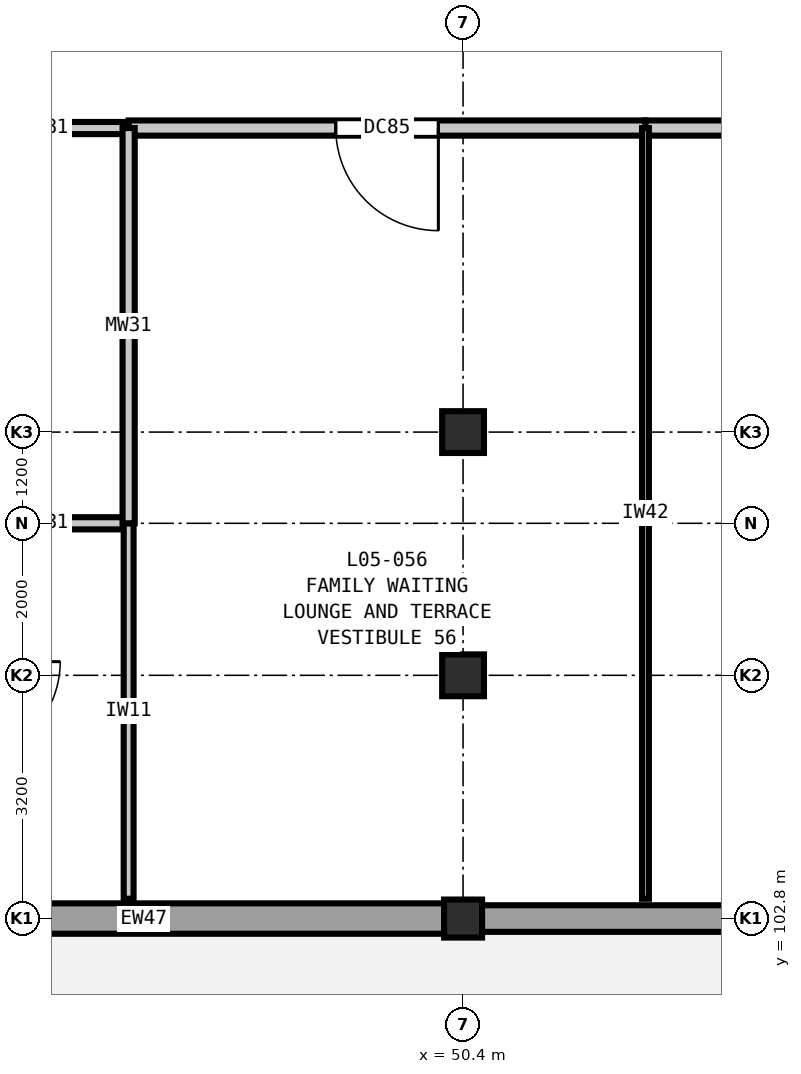
"""IFC4 building model, lengths in metres.
Left out: names, types, materials, properties, quantities, classifications, styles, units other than length and angle.
Written with IfcOpenShell. Run it as: python <this file> out.ifc"""

import sys

from ifc_helpers import new_model, si_unit, direction, frame, frame_2d, origin, origin_2d, place, context, subcontext, project, spatial, rectangle, extrude, element, fill, save


model = new_model("IFC4")
c1 = context("Model", 3, precision=1e-05, world=origin(), true_north=direction((0.0, 1.0)))
c2 = subcontext(c1, "Body", "Model", "MODEL_VIEW")
j1 = project(units=[si_unit("LENGTHUNIT", "METRE"), si_unit("PLANEANGLEUNIT", "RADIAN")], contexts=[c1])
p1 = place(None, origin())
s1 = spatial("IfcSite", under=j1, at=p1, CompositionType="ELEMENT")
p2 = place(p1, origin())
s2 = spatial("IfcBuilding", under=s1, at=p2, CompositionType="ELEMENT")
p3 = place(p2, frame((0.0, 0.0, 24.6)))
s3 = spatial("IfcBuildingStorey", under=s2, at=p3, CompositionType="ELEMENT", Elevation=24.6)
p4 = place(p3, frame((50.4, 102.8, 0.0), z_axis=(0.0, 0.0, 1.0), x_axis=(1.0, 0.0, 0.0)))
e1 = element("IfcColumn", 1, at=p4, inside=s3, PredefinedType="COLUMN", context=c2, shape_type="SweptSolid", body=[
    extrude(rectangle(XDim=0.5, YDim=0.5, at=origin_2d()), origin(), (0.0, 0.0, 1.0), 4.2),
])
for number, where, z_axis, x_axis in (
    (2, (50.4, 106.0, 0.0), (0.0, 0.0, 1.0), (1.0, 0.0, 0.0)),
    (3, (50.4, 109.2, 0.0), (0.0, 0.0, 1.0), (1.0, 0.0, 0.0)),
):
    element("IfcColumn", number, at=place(p3, frame(where, z_axis=z_axis, x_axis=x_axis)), inside=s3, PredefinedType="COLUMN", context=c2, shape_type="SweptSolid", body=[
        extrude(rectangle(XDim=0.55, YDim=0.55, at=origin_2d()), origin(), (0.0, 0.0, 1.0), 4.2),
    ])
p5 = place(p3, frame((58.552, 102.8, 0.0), z_axis=(0.0, 0.0, 1.0), x_axis=(-1.0, 0.0, 0.0)))
e4 = element("IfcWall", 4, at=p5, inside=s3, PredefinedType="SOLIDWALL", context=c2, shape_type="SweptSolid", body=[
    extrude(rectangle(XDim=7.904, YDim=0.35, at=frame_2d((3.952, 0.0))), origin(), (0.0, 0.0, 1.0), 3.48),
])
p6 = place(p5, frame((3.252, 0.0, 0.0)))
e5 = element("IfcOpeningElement", 5, at=p6, cuts=e4, PredefinedType="OPENING", context=c2, shape_type="SweptSolid", body=[
    extrude(rectangle(XDim=1.4, YDim=2.2, at=frame_2d((0.7, 1.1))), frame((0.0, 0.185, 0.0), z_axis=(0.0, -1.0, 0.0), x_axis=(1.0, 0.0, 0.0)), (0.0, 0.0, 1.0), 0.37),
])
p7 = place(p3, frame((50.152, 102.8, 0.0), z_axis=(0.0, 0.0, 1.0), x_axis=(-1.0, 0.0, 0.0)))
e6 = element("IfcWall", 6, at=p7, inside=s3, PredefinedType="SOLIDWALL", context=c2, shape_type="SweptSolid", body=[
    extrude(rectangle(XDim=7.904, YDim=0.4, at=frame_2d((3.952, 0.0))), origin(), (0.0, 0.0, 1.0), 3.48),
])
for number, where, z_axis, x_axis in (
    (7, (43.8, 108.0, 0.0), (0.0, 0.0, 1.0), (1.0, 0.0, 0.0)),
    (8, (43.8, 113.2, 0.0), (0.0, 0.0, 1.0), (1.0, 0.0, 0.0)),
):
    element("IfcWall", number, at=place(p3, frame(where, z_axis=z_axis, x_axis=x_axis)), inside=s3, PredefinedType="PLUMBINGWALL", context=c2, shape_type="SweptSolid", body=[
        extrude(rectangle(XDim=2.2, YDim=0.16, at=frame_2d((1.1, 0.0))), origin(), (0.0, 0.0, 1.0), 3.92),
    ])
p8 = place(p3, frame((46.0, 113.2, 0.0), z_axis=(0.0, 0.0, 1.0), x_axis=(1.0, 0.0, 0.0)))
e9 = element("IfcWall", 9, at=p8, inside=s3, PredefinedType="PARTITIONING", context=c2, shape_type="SweptSolid", body=[
    extrude(rectangle(XDim=6.8, YDim=0.2, at=frame_2d((3.4, 0.0))), origin(), (0.0, 0.0, 1.0), 3.92),
])
p9 = place(p8, frame((2.725, 0.0, 0.0)))
e10 = element("IfcOpeningElement", 10, at=p9, cuts=e9, PredefinedType="OPENING", context=c2, shape_type="SweptSolid", body=[
    extrude(rectangle(XDim=1.35, YDim=2.2, at=frame_2d((0.675, 1.1))), frame((0.0, 0.11, 0.0), z_axis=(0.0, -1.0, 0.0), x_axis=(1.0, 0.0, 0.0)), (0.0, 0.0, 1.0), 0.22),
])
p10 = place(p3, frame((52.8, 113.2, 0.0), z_axis=(0.0, 0.0, 1.0), x_axis=(1.0, 0.0, 0.0)))
e11 = element("IfcWall", 11, at=p10, inside=s3, PredefinedType="PARTITIONING", context=c2, shape_type="SweptSolid", body=[
    extrude(rectangle(XDim=8.6, YDim=0.2, at=frame_2d((4.3, 0.0))), origin(), (0.0, 0.0, 1.0), 3.92),
])
p11 = place(p10, frame((3.575, 0.0, 0.0)))
e12 = element("IfcOpeningElement", 12, at=p11, cuts=e11, PredefinedType="OPENING", context=c2, shape_type="SweptSolid", body=[
    extrude(rectangle(XDim=1.45, YDim=2.25, at=frame_2d((0.725, 1.125))), frame((0.0, 0.11, 0.0), z_axis=(0.0, -1.0, 0.0), x_axis=(1.0, 0.0, 0.0)), (0.0, 0.0, 1.0), 0.22),
])
p12 = place(p3, frame((46.0, 103.06, 0.0), z_axis=(0.0, 0.0, 1.0), x_axis=(0.0, 1.0, 0.0)))
e13 = element("IfcWall", 13, at=p12, inside=s3, PredefinedType="PARTITIONING", context=c2, shape_type="SweptSolid", body=[
    extrude(rectangle(XDim=4.94, YDim=0.13, at=frame_2d((2.47, 0.0))), origin(), (0.0, 0.0, 1.0), 3.92),
])
p13 = place(p3, frame((46.0, 108.0, 0.0), z_axis=(0.0, 0.0, 1.0), x_axis=(0.0, 1.0, 0.0)))
e14 = element("IfcWall", 14, at=p13, inside=s3, PredefinedType="PLUMBINGWALL", context=c2, shape_type="SweptSolid", body=[
    extrude(rectangle(XDim=5.2, YDim=0.16, at=frame_2d((2.6, 0.0))), origin(), (0.0, 0.0, 1.0), 3.92),
])
p14 = place(p3, frame((52.8, 103.06, 0.0), z_axis=(0.0, 0.0, 1.0), x_axis=(0.0, 1.0, 0.0)))
e15 = element("IfcWall", 15, at=p14, inside=s3, PredefinedType="PARTITIONING", context=c2, shape_type="SweptSolid", body=[
    extrude(rectangle(XDim=10.14, YDim=0.09, at=frame_2d((5.07, 0.0))), origin(), (0.0, 0.0, 1.0), 3.92),
])
p15 = place(p9, frame((1.35, 0.0, 0.0), z_axis=(0.0, 0.0, 1.0), x_axis=(-1.0, 0.0, 0.0)))
e16 = element("IfcDoor", 16, at=p15, inside=s3, OperationType="SINGLE_SWING_LEFT", PredefinedType="DOOR", context=c2, shape_type="SweptSolid", body=[
    extrude(rectangle(XDim=1.35, YDim=2.2, at=frame_2d((0.675, 1.1))), frame((0.0, 0.025, 0.0), z_axis=(0.0, -1.0, 0.0), x_axis=(1.0, 0.0, 0.0)), (0.0, 0.0, 1.0), 0.05),
])
fill(e10, e16)
save(model, sys.argv[1])
